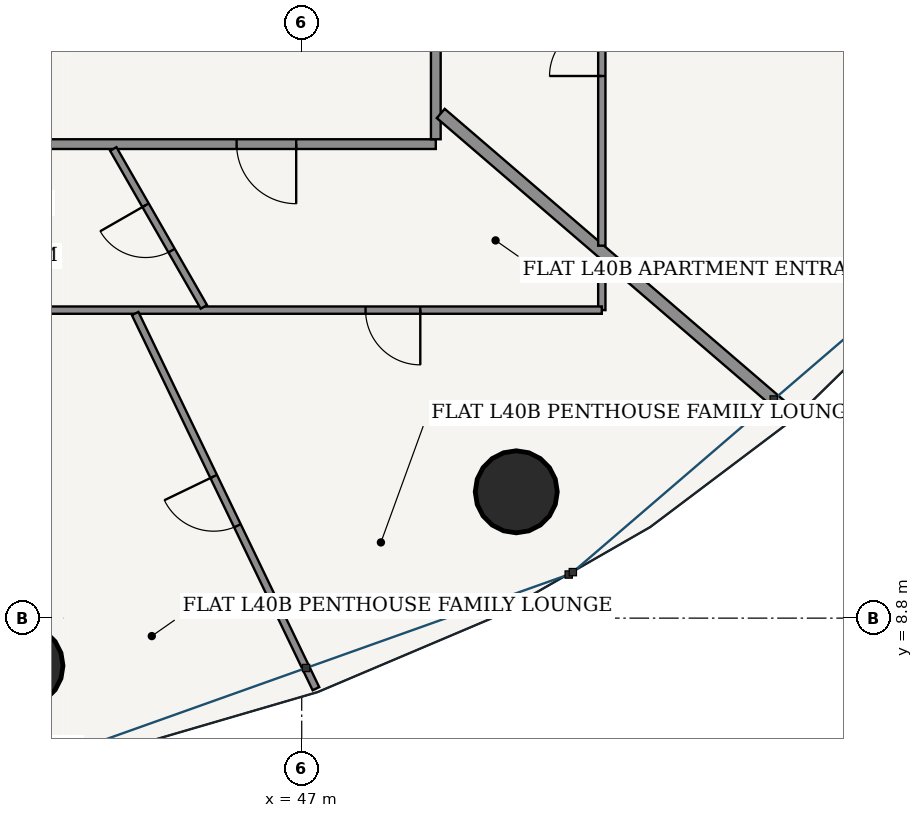
"""IFC4 building model, lengths in metres.
Left out: names, types, materials, properties, quantities, classifications, styles, units other than length and angle.
Written with IfcOpenShell. Run it as: python <this file> out.ifc"""

import sys

from ifc_helpers import new_model, si_unit, direction, frame, frame_2d, origin, origin_2d, place, context, subcontext, project, spatial, rectangle, hollow_circle, extrude, source, transform, mapped, element, fill, save


model = new_model("IFC4")
c1 = context("Model", 3, precision=1e-05, world=origin(), true_north=direction((-0.2419218956, 0.970295726276)))
c2 = subcontext(c1, "Body", "Model", "MODEL_VIEW")
j1 = project(units=[si_unit("LENGTHUNIT", "METRE"), si_unit("PLANEANGLEUNIT", "RADIAN")], contexts=[c1])
p1 = place(None, origin())
s1 = spatial("IfcSite", under=j1, at=p1, CompositionType="ELEMENT")
p2 = place(p1, origin())
s2 = spatial("IfcBuilding", under=s1, at=p2, CompositionType="ELEMENT")
p3 = place(p2, frame((0.0, 0.0, 153.4)))
s3 = spatial("IfcBuildingStorey", under=s2, at=p3, CompositionType="ELEMENT", Elevation=153.4)
for number, where, z_axis, x_axis in (
    (1, (42.399, 8.018, 0.0), (0.0, 0.0, 1.0), (1.0, 0.0, 0.0)),
    (2, (50.528, 10.877, 0.0), (0.0, 0.0, 1.0), (1.0, 0.0, 0.0)),
):
    element("IfcColumn", number, at=place(p3, frame(where, z_axis=z_axis, x_axis=x_axis)), inside=s3, PredefinedType="COLUMN", context=c2, shape_type="SweptSolid", body=[
        extrude(hollow_circle(Radius=0.675, WallThickness=0.042, at=origin_2d()), origin(), (0.0, 0.0, 1.0), 3.6),
    ])
p4 = place(p3, frame((34.32, 16.595, 0.0), z_axis=(0.0, 0.0, 1.0), x_axis=(1.0, 0.0, 0.0)))
e3 = element("IfcWall", 3, at=p4, inside=s3, PredefinedType="PARTITIONING", context=c2, shape_type="SweptSolid", body=[
    extrude(rectangle(XDim=14.885, YDim=0.16, at=frame_2d((7.442, 0.0))), origin(), (0.0, 0.0, 1.0), 2.776),
])
p5 = place(p4, frame((11.609, 0.0, 0.0)))
e4 = element("IfcOpeningElement", 4, at=p5, cuts=e3, PredefinedType="OPENING", context=c2, shape_type="SweptSolid", body=[
    extrude(rectangle(XDim=0.98, YDim=2.2, at=frame_2d((0.49, 1.1))), frame((0.0, 0.09, 0.0), z_axis=(0.0, -1.0, 0.0), x_axis=(1.0, 0.0, 0.0)), (0.0, 0.0, 1.0), 0.18),
])
p6 = place(p3, frame((49.205, 16.675, 0.0), z_axis=(0.0, 0.0, 1.0), x_axis=(0.0, 1.0, 0.0)))
e5 = element("IfcWall", 5, at=p6, inside=s3, PredefinedType="PARTITIONING", context=c2, shape_type="SweptSolid", body=[
    extrude(rectangle(XDim=18.4, YDim=0.16, at=frame_2d((9.2, 0.0))), origin(), (0.0, 0.0, 1.0), 2.776),
])
p7 = place(p6, frame((15.299, 0.0, 0.0)))
e6 = element("IfcOpeningElement", 6, at=p7, cuts=e5, PredefinedType="OPENING", context=c2, shape_type="SweptSolid", body=[
    extrude(rectangle(XDim=0.98, YDim=2.2, at=frame_2d((0.49, 1.1))), frame((0.0, 0.09, 0.0), z_axis=(0.0, -1.0, 0.0), x_axis=(1.0, 0.0, 0.0)), (0.0, 0.0, 1.0), 0.18),
])
p8 = place(p3, frame((51.935, 14.721, 0.0), z_axis=(0.0, 0.0, 1.0), x_axis=(0.0, -1.0, 0.0)))
e7 = element("IfcWall", 7, at=p8, inside=s3, PredefinedType="PARTITIONING", context=c2, shape_type="SweptSolid", body=[
    extrude(rectangle(XDim=0.856, YDim=0.12, at=frame_2d((0.428, 0.0))), origin(), (0.0, 0.0, 1.0), 3.33),
])
p9 = place(p3, frame((51.935, 13.865, 0.0), z_axis=(0.0, 0.0, 1.0), x_axis=(-1.0, 0.0, 0.0)))
e8 = element("IfcWall", 8, at=p9, inside=s3, PredefinedType="PARTITIONING", context=c2, shape_type="SweptSolid", body=[
    extrude(rectangle(XDim=20.345, YDim=0.12, at=frame_2d((10.172, 0.0))), origin(), (0.0, 0.0, 1.0), 2.776),
])
p10 = place(p9, frame((2.985, 0.0, 0.0)))
e9 = element("IfcOpeningElement", 9, at=p10, cuts=e8, PredefinedType="OPENING", context=c2, shape_type="SweptSolid", body=[
    extrude(rectangle(XDim=0.9, YDim=2.15, at=frame_2d((0.45, 1.075))), frame((0.0, 0.07, 0.0), z_axis=(0.0, -1.0, 0.0), x_axis=(1.0, 0.0, 0.0)), (0.0, 0.0, 1.0), 0.14),
])
p11 = place(p9, frame((12.333, 0.0, 0.0)))
e10 = element("IfcOpeningElement", 10, at=p11, cuts=e8, PredefinedType="OPENING", context=c2, shape_type="SweptSolid", body=[
    extrude(rectangle(XDim=0.9, YDim=2.15, at=frame_2d((0.45, 1.075))), frame((0.0, 0.07, 0.0), z_axis=(0.0, -1.0, 0.0), x_axis=(1.0, 0.0, 0.0)), (0.0, 0.0, 1.0), 0.14),
])
p12 = place(p9, frame((18.436, 0.0, 0.0)))
e11 = element("IfcOpeningElement", 11, at=p12, cuts=e8, PredefinedType="OPENING", context=c2, shape_type="SweptSolid", body=[
    extrude(rectangle(XDim=0.9, YDim=2.15, at=frame_2d((0.45, 1.075))), frame((0.0, 0.07, 0.0), z_axis=(0.0, -1.0, 0.0), x_axis=(1.0, 0.0, 0.0)), (0.0, 0.0, 1.0), 0.14),
])
p13 = place(p3, frame((44.26, 13.809, 0.0), z_axis=(0.0, 0.0, 1.0), x_axis=(0.434162832987, -0.900834410118, 0.0)))
e12 = element("IfcWall", 12, at=p13, inside=s3, PredefinedType="PARTITIONING", context=c2, shape_type="SweptSolid", body=[
    extrude(rectangle(XDim=6.849, YDim=0.12, at=frame_2d((3.425, 0.0))), origin(), (0.0, 0.0, 1.0), 2.846),
])
p14 = place(p13, frame((2.975, 0.0, 0.0)))
e13 = element("IfcOpeningElement", 13, at=p14, cuts=e12, PredefinedType="OPENING", context=c2, shape_type="SweptSolid", body=[
    extrude(rectangle(XDim=0.9, YDim=2.15, at=frame_2d((0.45, 1.075))), frame((0.0, 0.07, 0.0), z_axis=(0.0, -1.0, 0.0), x_axis=(1.0, 0.0, 0.0)), (0.0, 0.0, 1.0), 0.14),
])
p15 = place(p3, frame((43.901, 16.515, 0.0), z_axis=(0.0, 0.0, 1.0), x_axis=(0.497640283609, -0.86738350695, 0.0)))
e14 = element("IfcWall", 14, at=p15, inside=s3, PredefinedType="PARTITIONING", context=c2, shape_type="SweptSolid", body=[
    extrude(rectangle(XDim=2.993, YDim=0.12, at=frame_2d((1.497, 0.0))), origin(), (0.0, 0.0, 1.0), 3.005),
])
p16 = place(p15, frame((1.067, 0.0, 0.0)))
e15 = element("IfcOpeningElement", 15, at=p16, cuts=e14, PredefinedType="OPENING", context=c2, shape_type="SweptSolid", body=[
    extrude(rectangle(XDim=0.86, YDim=2.15, at=frame_2d((0.43, 1.075))), frame((0.0, 0.07, 0.0), z_axis=(0.0, -1.0, 0.0), x_axis=(1.0, 0.0, 0.0)), (0.0, 0.0, 1.0), 0.14),
])
p17 = place(p3, frame((49.287, 17.099, 0.0), z_axis=(0.0, 0.0, 1.0), x_axis=(0.758362300646, -0.651833276965, 0.0)))
e16 = element("IfcWall", 16, at=p17, inside=s3, PredefinedType="PARTITIONING", context=c2, shape_type="SweptSolid", body=[
    extrude(rectangle(XDim=7.618, YDim=0.2, at=frame_2d((3.809, 0.0))), origin(), (0.0, 0.0, 1.0), 2.846),
])
p18 = place(p3, frame((51.935, 37.885, 0.0), z_axis=(0.0, 0.0, 1.0), x_axis=(0.0, -1.0, 0.0)))
e17 = element("IfcWall", 17, at=p18, inside=s3, PredefinedType="PARTITIONING", context=c2, shape_type="SweptSolid", body=[
    extrude(rectangle(XDim=22.96, YDim=0.12, at=frame_2d((11.48, 0.0))), origin(), (0.0, 0.0, 1.0), 2.776),
])
p19 = place(p18, frame((4.61, 0.0, 0.0)))
e18 = element("IfcOpeningElement", 18, at=p19, cuts=e17, PredefinedType="OPENING", context=c2, shape_type="SweptSolid", body=[
    extrude(rectangle(XDim=0.9, YDim=2.15, at=frame_2d((0.45, 1.075))), frame((0.0, 0.07, 0.0), z_axis=(0.0, -1.0, 0.0), x_axis=(1.0, 0.0, 0.0)), (0.0, 0.0, 1.0), 0.14),
])
p20 = place(p18, frame((19.31, 0.0, 0.0)))
e19 = element("IfcOpeningElement", 19, at=p20, cuts=e17, PredefinedType="OPENING", context=c2, shape_type="SweptSolid", body=[
    extrude(rectangle(XDim=0.86, YDim=2.15, at=frame_2d((0.43, 1.075))), frame((0.0, 0.07, 0.0), z_axis=(0.0, -1.0, 0.0), x_axis=(1.0, 0.0, 0.0)), (0.0, 0.0, 1.0), 0.14),
])
p21 = place(p18, frame((13.341, 0.0, 0.0)))
e20 = element("IfcOpeningElement", 20, at=p21, cuts=e17, PredefinedType="OPENING", context=c2, shape_type="SweptSolid", body=[
    extrude(rectangle(XDim=0.9, YDim=2.15, at=frame_2d((0.45, 1.075))), frame((0.0, 0.07, 0.0), z_axis=(0.0, -1.0, 0.0), x_axis=(1.0, 0.0, 0.0)), (0.0, 0.0, 1.0), 0.14),
])
m1 = source(origin(), c2, "Body", "SweptSolid", [
    extrude(rectangle(XDim=0.98, YDim=2.2, at=frame_2d((0.49, 1.1))), frame((0.0, 0.025, 0.0), z_axis=(0.0, -1.0, 0.0), x_axis=(1.0, 0.0, 0.0)), (0.0, 0.0, 1.0), 0.05),
])
p22 = place(p5, frame((0.98, 0.0, 0.0), z_axis=(0.0, 0.0, 1.0), x_axis=(-1.0, 0.0, 0.0)))
e21 = element("IfcDoor", 21, at=p22, inside=s3, OperationType="SINGLE_SWING_LEFT", PredefinedType="DOOR", context=c2, shape_type="MappedRepresentation", body=[
    mapped(m1, transform((0.0, 0.0, 0.0), scale=1.0)),
])
fill(e4, e21)
m2 = source(origin(), c2, "Body", "SweptSolid", [
    extrude(rectangle(XDim=0.86, YDim=2.15, at=frame_2d((0.43, 1.075))), frame((0.0, 0.025, 0.0), z_axis=(0.0, -1.0, 0.0), x_axis=(1.0, 0.0, 0.0)), (0.0, 0.0, 1.0), 0.05),
])
p23 = place(p16, frame((0.86, 0.0, 0.0), z_axis=(0.0, 0.0, 1.0), x_axis=(-1.0, 0.0, 0.0)))
e22 = element("IfcDoor", 22, at=p23, inside=s3, OperationType="SINGLE_SWING_RIGHT", PredefinedType="DOOR", context=c2, shape_type="MappedRepresentation", body=[
    mapped(m2, transform((0.0, 0.0, 0.0), scale=1.0)),
])
fill(e15, e22)
m3 = source(origin(), c2, "Body", "SweptSolid", [
    extrude(rectangle(XDim=0.9, YDim=2.15, at=frame_2d((0.45, 1.075))), frame((0.0, 0.025, 0.0), z_axis=(0.0, -1.0, 0.0), x_axis=(1.0, 0.0, 0.0)), (0.0, 0.0, 1.0), 0.05),
])
p24 = place(p10, origin())
e23 = element("IfcDoor", 23, at=p24, inside=s3, OperationType="SINGLE_SWING_LEFT", PredefinedType="DOOR", context=c2, shape_type="MappedRepresentation", body=[
    mapped(m3, transform((0.0, 0.0, 0.0), scale=1.0)),
])
fill(e9, e23)
p25 = place(p14, frame((0.9, 0.0, 0.0), z_axis=(0.0, 0.0, 1.0), x_axis=(-1.0, 0.0, 0.0)))
e24 = element("IfcDoor", 24, at=p25, inside=s3, OperationType="SINGLE_SWING_RIGHT", PredefinedType="DOOR", context=c2, shape_type="MappedRepresentation", body=[
    mapped(m3, transform((0.0, 0.0, 0.0), scale=1.0)),
])
fill(e13, e24)
p26 = place(p20, frame((0.86, 0.0, 0.0), z_axis=(0.0, 0.0, 1.0), x_axis=(-1.0, 0.0, 0.0)))
e25 = element("IfcDoor", 25, at=p26, inside=s3, OperationType="SINGLE_SWING_LEFT", PredefinedType="DOOR", context=c2, shape_type="MappedRepresentation", body=[
    mapped(m2, transform((0.0, 0.0, 0.0), scale=1.0)),
])
fill(e19, e25)
save(model, sys.argv[1])
